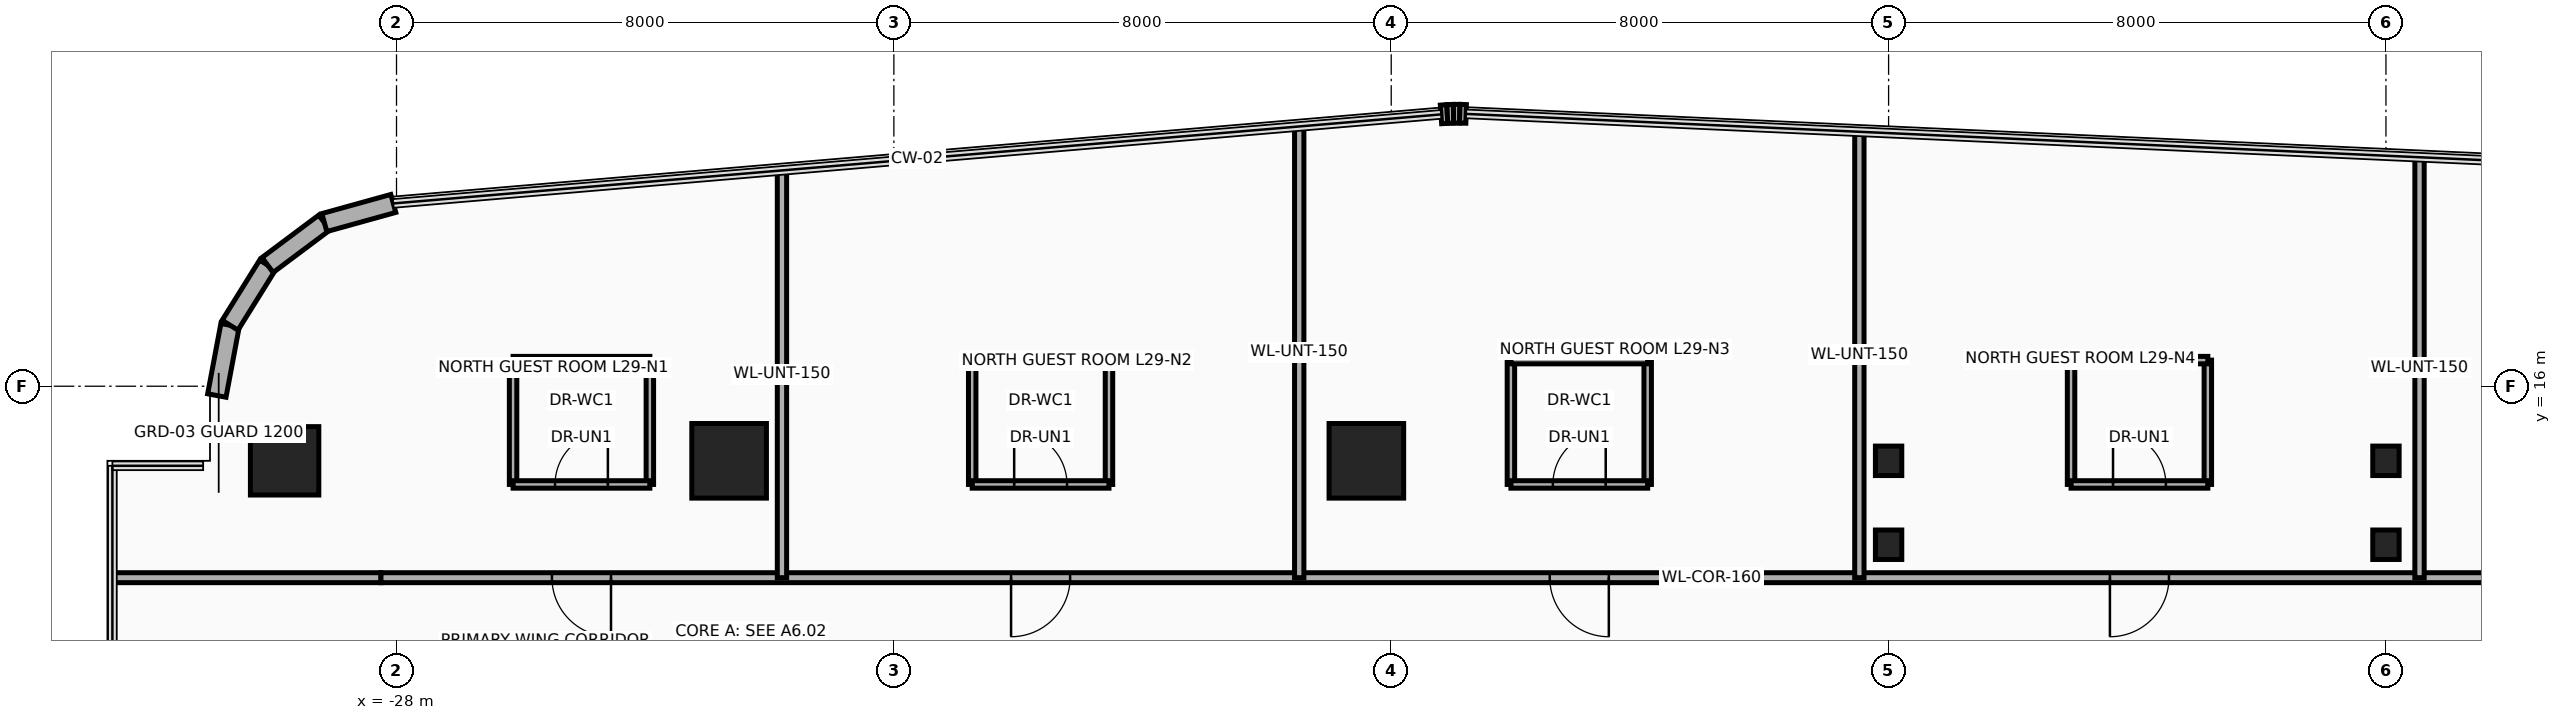
"""IFC4 building model, lengths in metres.
Left out: names, types, materials, properties, quantities, classifications, styles, units other than length and angle.
Written with IfcOpenShell. Run it as: python <this file> out.ifc"""

import sys

from ifc_helpers import new_model, si_unit, direction, frame, frame_2d, origin, origin_2d, place, context, subcontext, project, spatial, rectangle, circle, i_section, extrude, source, transform, mapped, element, fill, save


model = new_model("IFC4")
c1 = context("Model", 3, precision=1e-05, world=origin(), true_north=direction((0.0, 1.0)))
c2 = subcontext(c1, "Body", "Model", "MODEL_VIEW")
j1 = project(units=[si_unit("LENGTHUNIT", "METRE"), si_unit("PLANEANGLEUNIT", "RADIAN")], contexts=[c1])
p1 = place(None, origin())
s1 = spatial("IfcSite", under=j1, at=p1, CompositionType="ELEMENT")
p2 = place(p1, origin())
s2 = spatial("IfcBuilding", under=s1, at=p2, CompositionType="ELEMENT")
p3 = place(p2, frame((0.0, 0.0, 116.8)))
s3 = spatial("IfcBuildingStorey", under=s2, at=p3, CompositionType="ELEMENT", Elevation=116.8)
m1 = source(origin(), c2, "Body", "SweptSolid", [
    extrude(circle(Radius=0.55, at=origin_2d()), origin(), (0.0, 0.0, 1.0), 3.7),
])
p4 = place(p3, frame((-29.8, 14.8, 0.0), z_axis=(0.0, 0.0, 1.0), x_axis=(1.0, 0.0, 0.0)))
e1 = element("IfcColumn", 1, at=p4, inside=s3, PredefinedType="COLUMN", context=c2, shape_type="MappedRepresentation", body=[
    mapped(m1, transform((0.0, 0.0, 0.0), x_axis=(1.0, 0.0, 0.0), y_axis=(0.0, 1.0, 0.0), z_axis=(0.0, 0.0, 1.0), scale=1.0)),
])
m2 = source(origin(), c2, "Body", "SweptSolid", [
    extrude(rectangle(XDim=1.2, YDim=1.2, at=origin_2d()), origin(), (0.0, 0.0, 1.0), 3.7),
])
for number, where, z_axis, x_axis in (
    (2, (-22.65, 14.8, 0.0), (0.0, 0.0, 1.0), (1.0, 0.0, 0.0)),
    (3, (-12.4, 14.8, 0.0), (0.0, 0.0, 1.0), (1.0, 0.0, 0.0)),
):
    element("IfcColumn", number, at=place(p3, frame(where, z_axis=z_axis, x_axis=x_axis)), inside=s3, PredefinedType="COLUMN", context=c2, shape_type="MappedRepresentation", body=[
        mapped(m2, transform((0.0, 0.0, 0.0), x_axis=(1.0, 0.0, 0.0), y_axis=(0.0, 1.0, 0.0), z_axis=(0.0, 0.0, 1.0), scale=1.0)),
    ])
m3 = source(origin(), c2, "Body", "SweptSolid", [
    extrude(i_section(OverallWidth=0.424, OverallDepth=0.474, WebThickness=0.048, FlangeThickness=0.077, at=origin_2d()), origin(), (0.0, 0.0, 1.0), 3.7),
])
for number, where, z_axis, x_axis in (
    (4, (-4.0, 13.45, 0.0), (0.0, 0.0, 1.0), (1.0, 0.0, 0.0)),
    (5, (-4.0, 14.8, 0.0), (0.0, 0.0, 1.0), (1.0, 0.0, 0.0)),
    (6, (4.0, 13.45, 0.0), (0.0, 0.0, 1.0), (1.0, 0.0, 0.0)),
    (7, (4.0, 14.8, 0.0), (0.0, 0.0, 1.0), (1.0, 0.0, 0.0)),
):
    element("IfcColumn", number, at=place(p3, frame(where, z_axis=z_axis, x_axis=x_axis)), inside=s3, PredefinedType="COLUMN", context=c2, shape_type="MappedRepresentation", body=[
        mapped(m3, transform((0.0, 0.0, 0.0), x_axis=(1.0, 0.0, 0.0), y_axis=(0.0, 1.0, 0.0), z_axis=(0.0, 0.0, 1.0), scale=1.0)),
    ])
p5 = place(p3, frame((-30.89, 15.85, 0.0), z_axis=(0.0, 0.0, 1.0), x_axis=(0.184557499391, 0.982821718023, 0.0)))
e8 = element("IfcWall", 8, at=p5, inside=s3, PredefinedType="SOLIDWALL", context=c2, shape_type="SweptSolid", body=[
    extrude(rectangle(XDim=1.151, YDim=0.3, at=frame_2d((0.575, 0.0))), origin(), (0.0, 0.0, 1.0), 3.46),
])
p6 = place(p3, frame((-30.677, 16.981, 0.0), z_axis=(0.0, 0.0, 1.0), x_axis=(0.52880576008, 0.848742875143, 0.0)))
e9 = element("IfcWall", 9, at=p6, inside=s3, PredefinedType="SOLIDWALL", context=c2, shape_type="SweptSolid", body=[
    extrude(rectangle(XDim=1.141, YDim=0.3, at=frame_2d((0.57, 0.0))), origin(), (0.0, 0.0, 1.0), 3.46),
])
p7 = place(p3, frame((-30.074, 17.95, 0.0), z_axis=(0.0, 0.0, 1.0), x_axis=(0.800975009324, 0.598697782223, 0.0)))
e10 = element("IfcWall", 10, at=p7, inside=s3, PredefinedType="SOLIDWALL", context=c2, shape_type="SweptSolid", body=[
    extrude(rectangle(XDim=1.141, YDim=0.3, at=frame_2d((0.57, 0.0))), origin(), (0.0, 0.0, 1.0), 3.46),
])
p8 = place(p3, frame((-29.161, 18.633, 0.0), z_axis=(0.0, 0.0, 1.0), x_axis=(0.963624193367, 0.267260947313, 0.0)))
e11 = element("IfcWall", 11, at=p8, inside=s3, PredefinedType="SOLIDWALL", context=c2, shape_type="SweptSolid", body=[
    extrude(rectangle(XDim=1.151, YDim=0.3, at=frame_2d((0.575, 0.0))), origin(), (0.0, 0.0, 1.0), 3.46),
])
p9 = place(p3, frame((-11.199, 20.373, 0.0), z_axis=(0.0, 0.0, 1.0), x_axis=(0.997567332166, 0.069709524416, 0.0)))
e12 = element("IfcWall", 12, at=p9, inside=s3, PredefinedType="SOLIDWALL", context=c2, shape_type="SweptSolid", body=[
    extrude(rectangle(XDim=0.102, YDim=0.3, at=frame_2d((0.051, 0.0))), origin(), (0.0, 0.0, 1.0), 3.46),
])
p10 = place(p3, frame((-11.098, 20.38, 0.0), z_axis=(0.0, 0.0, 1.0), x_axis=(0.999334672785, 0.03647206835, 0.0)))
e13 = element("IfcWall", 13, at=p10, inside=s3, PredefinedType="SOLIDWALL", context=c2, shape_type="SweptSolid", body=[
    extrude(rectangle(XDim=0.1, YDim=0.3, at=frame_2d((0.05, 0.0))), origin(), (0.0, 0.0, 1.0), 3.46),
])
p11 = place(p3, frame((-10.998, 20.383, 0.0), z_axis=(0.0, 0.0, 1.0), x_axis=(0.999997054401, 0.002427177317, 0.0)))
e14 = element("IfcWall", 14, at=p11, inside=s3, PredefinedType="SOLIDWALL", context=c2, shape_type="SweptSolid", body=[
    extrude(rectangle(XDim=0.101, YDim=0.3, at=frame_2d((0.05, 0.0))), origin(), (0.0, 0.0, 1.0), 3.46),
])
p12 = place(p3, frame((-10.897, 20.384, 0.0), z_axis=(0.0, 0.0, 1.0), x_axis=(0.999584209171, -0.02883415988, 0.0)))
e15 = element("IfcWall", 15, at=p12, inside=s3, PredefinedType="SOLIDWALL", context=c2, shape_type="SweptSolid", body=[
    extrude(rectangle(XDim=0.102, YDim=0.3, at=frame_2d((0.051, 0.0))), origin(), (0.0, 0.0, 1.0), 3.46),
])
p13 = place(p3, frame((-32.54, 12.92, 0.0), z_axis=(0.0, 0.0, 1.0), x_axis=(1.0, 0.0, 0.0)))
e16 = element("IfcWall", 16, at=p13, inside=s3, PredefinedType="PARTITIONING", context=c2, shape_type="SweptSolid", body=[
    extrude(rectangle(XDim=4.29, YDim=0.16, at=frame_2d((2.145, 0.0))), origin(), (0.0, 0.0, 1.0), 2.896),
])
p14 = place(p3, frame((-28.25, 12.92, 0.0), z_axis=(0.0, 0.0, 1.0), x_axis=(1.0, 0.0, 0.0)))
e17 = element("IfcWall", 17, at=p14, inside=s3, PredefinedType="PARTITIONING", context=c2, shape_type="SweptSolid", body=[
    extrude(rectangle(XDim=41.8, YDim=0.16, at=frame_2d((20.9, 0.0))), origin(), (0.0, 0.0, 1.0), 2.666),
])
p15 = place(p14, frame((2.75, 0.0, 0.0)))
e18 = element("IfcOpeningElement", 18, at=p15, cuts=e17, PredefinedType="OPENING", context=c2, shape_type="SweptSolid", body=[
    extrude(rectangle(XDim=0.95, YDim=2.15, at=frame_2d((0.475, 1.075))), frame((0.0, 0.095, 0.0), z_axis=(0.0, -1.0, 0.0), x_axis=(1.0, 0.0, 0.0)), (0.0, 0.0, 1.0), 0.19),
])
p16 = place(p14, frame((10.135, 0.0, 0.0)))
e19 = element("IfcOpeningElement", 19, at=p16, cuts=e17, PredefinedType="OPENING", context=c2, shape_type="SweptSolid", body=[
    extrude(rectangle(XDim=0.95, YDim=2.15, at=frame_2d((0.475, 1.075))), frame((0.0, 0.095, 0.0), z_axis=(0.0, -1.0, 0.0), x_axis=(1.0, 0.0, 0.0)), (0.0, 0.0, 1.0), 0.19),
])
p17 = place(p14, frame((18.8, 0.0, 0.0)))
e20 = element("IfcOpeningElement", 20, at=p17, cuts=e17, PredefinedType="OPENING", context=c2, shape_type="SweptSolid", body=[
    extrude(rectangle(XDim=0.95, YDim=2.15, at=frame_2d((0.475, 1.075))), frame((0.0, 0.095, 0.0), z_axis=(0.0, -1.0, 0.0), x_axis=(1.0, 0.0, 0.0)), (0.0, 0.0, 1.0), 0.19),
])
p18 = place(p14, frame((27.81, 0.0, 0.0)))
e21 = element("IfcOpeningElement", 21, at=p18, cuts=e17, PredefinedType="OPENING", context=c2, shape_type="SweptSolid", body=[
    extrude(rectangle(XDim=0.95, YDim=2.15, at=frame_2d((0.475, 1.075))), frame((0.0, 0.095, 0.0), z_axis=(0.0, -1.0, 0.0), x_axis=(1.0, 0.0, 0.0)), (0.0, 0.0, 1.0), 0.19),
])
p19 = place(p14, frame((35.72, 0.0, 0.0)))
e22 = element("IfcOpeningElement", 22, at=p19, cuts=e17, PredefinedType="OPENING", context=c2, shape_type="SweptSolid", body=[
    extrude(rectangle(XDim=0.95, YDim=2.15, at=frame_2d((0.475, 1.075))), frame((0.0, 0.095, 0.0), z_axis=(0.0, -1.0, 0.0), x_axis=(1.0, 0.0, 0.0)), (0.0, 0.0, 1.0), 0.19),
])
p20 = place(p3, frame((-21.8, 12.92, 0.0), z_axis=(0.0, 0.0, 1.0), x_axis=(0.0, 1.0, 0.0)))
e23 = element("IfcWall", 23, at=p20, inside=s3, PredefinedType="PARTITIONING", context=c2, shape_type="SweptSolid", body=[
    extrude(rectangle(XDim=6.552, YDim=0.15, at=frame_2d((3.276, 0.0))), origin(), (0.0, 0.0, 1.0), 2.666),
])
p21 = place(p3, frame((-13.48, 12.92, 0.0), z_axis=(0.0, 0.0, 1.0), x_axis=(0.0, 1.0, 0.0)))
e24 = element("IfcWall", 24, at=p21, inside=s3, PredefinedType="PARTITIONING", context=c2, shape_type="SweptSolid", body=[
    extrude(rectangle(XDim=7.259, YDim=0.15, at=frame_2d((3.629, 0.0))), origin(), (0.0, 0.0, 1.0), 2.666),
])
p22 = place(p3, frame((-4.47, 12.92, 0.0), z_axis=(0.0, 0.0, 1.0), x_axis=(0.0, 1.0, 0.0)))
e25 = element("IfcWall", 25, at=p22, inside=s3, PredefinedType="PARTITIONING", context=c2, shape_type="SweptSolid", body=[
    extrude(rectangle(XDim=7.173, YDim=0.15, at=frame_2d((3.586, 0.0))), origin(), (0.0, 0.0, 1.0), 2.666),
])
p23 = place(p3, frame((4.54, 12.92, 0.0), z_axis=(0.0, 0.0, 1.0), x_axis=(0.0, 1.0, 0.0)))
e26 = element("IfcWall", 26, at=p23, inside=s3, PredefinedType="PARTITIONING", context=c2, shape_type="SweptSolid", body=[
    extrude(rectangle(XDim=6.764, YDim=0.15, at=frame_2d((3.382, 0.0))), origin(), (0.0, 0.0, 1.0), 2.666),
])
for number, where, z_axis, x_axis in (
    (27, (-26.125, 14.42, 0.0), (0.0, 0.0, 1.0), (0.0, 1.0, 0.0)),
    (28, (-23.925, 14.42, 0.0), (0.0, 0.0, 1.0), (0.0, 1.0, 0.0)),
):
    element("IfcWall", number, at=place(p3, frame(where, z_axis=z_axis, x_axis=x_axis)), inside=s3, PredefinedType="PARTITIONING", context=c2, shape_type="SweptSolid", body=[
        extrude(rectangle(XDim=2.0, YDim=0.12, at=frame_2d((1.0, 0.0))), origin(), (0.0, 0.0, 1.0), 2.666),
    ])
p24 = place(p3, frame((-26.125, 16.42, 0.0), z_axis=(0.0, 0.0, 1.0), x_axis=(1.0, 0.0, 0.0)))
e29 = element("IfcWall", 29, at=p24, inside=s3, PredefinedType="PARTITIONING", context=c2, shape_type="SweptSolid", body=[
    extrude(rectangle(XDim=2.2, YDim=0.12, at=frame_2d((1.1, 0.0))), origin(), (0.0, 0.0, 1.0), 3.46),
])
p25 = place(p3, frame((-26.125, 14.42, 0.0), z_axis=(0.0, 0.0, 1.0), x_axis=(1.0, 0.0, 0.0)))
e30 = element("IfcWall", 30, at=p25, inside=s3, PredefinedType="PARTITIONING", context=c2, shape_type="SweptSolid", body=[
    extrude(rectangle(XDim=2.2, YDim=0.12, at=frame_2d((1.1, 0.0))), origin(), (0.0, 0.0, 1.0), 3.46),
])
p26 = place(p25, frame((0.675, 0.0, 0.0)))
e31 = element("IfcOpeningElement", 31, at=p26, cuts=e30, PredefinedType="OPENING", context=c2, shape_type="SweptSolid", body=[
    extrude(rectangle(XDim=0.85, YDim=2.1, at=frame_2d((0.425, 1.05))), frame((0.0, 0.075, 0.0), z_axis=(0.0, -1.0, 0.0), x_axis=(1.0, 0.0, 0.0)), (0.0, 0.0, 1.0), 0.15),
])
for number, where, z_axis, x_axis in (
    (32, (-18.74, 14.42, 0.0), (0.0, 0.0, 1.0), (0.0, 1.0, 0.0)),
    (33, (-16.54, 14.42, 0.0), (0.0, 0.0, 1.0), (0.0, 1.0, 0.0)),
):
    element("IfcWall", number, at=place(p3, frame(where, z_axis=z_axis, x_axis=x_axis)), inside=s3, PredefinedType="PARTITIONING", context=c2, shape_type="SweptSolid", body=[
        extrude(rectangle(XDim=2.0, YDim=0.12, at=frame_2d((1.0, 0.0))), origin(), (0.0, 0.0, 1.0), 2.666),
    ])
p27 = place(p3, frame((-18.74, 16.42, 0.0), z_axis=(0.0, 0.0, 1.0), x_axis=(1.0, 0.0, 0.0)))
e34 = element("IfcWall", 34, at=p27, inside=s3, PredefinedType="PARTITIONING", context=c2, shape_type="SweptSolid", body=[
    extrude(rectangle(XDim=2.2, YDim=0.12, at=frame_2d((1.1, 0.0))), origin(), (0.0, 0.0, 1.0), 3.46),
])
p28 = place(p3, frame((-18.74, 14.42, 0.0), z_axis=(0.0, 0.0, 1.0), x_axis=(1.0, 0.0, 0.0)))
e35 = element("IfcWall", 35, at=p28, inside=s3, PredefinedType="PARTITIONING", context=c2, shape_type="SweptSolid", body=[
    extrude(rectangle(XDim=2.2, YDim=0.12, at=frame_2d((1.1, 0.0))), origin(), (0.0, 0.0, 1.0), 3.46),
])
p29 = place(p28, frame((0.675, 0.0, 0.0)))
e36 = element("IfcOpeningElement", 36, at=p29, cuts=e35, PredefinedType="OPENING", context=c2, shape_type="SweptSolid", body=[
    extrude(rectangle(XDim=0.85, YDim=2.1, at=frame_2d((0.425, 1.05))), frame((0.0, 0.075, 0.0), z_axis=(0.0, -1.0, 0.0), x_axis=(1.0, 0.0, 0.0)), (0.0, 0.0, 1.0), 0.15),
])
for number, where, z_axis, x_axis in (
    (37, (-10.075, 14.42, 0.0), (0.0, 0.0, 1.0), (0.0, 1.0, 0.0)),
    (38, (-7.875, 14.42, 0.0), (0.0, 0.0, 1.0), (0.0, 1.0, 0.0)),
):
    element("IfcWall", number, at=place(p3, frame(where, z_axis=z_axis, x_axis=x_axis)), inside=s3, PredefinedType="PARTITIONING", context=c2, shape_type="SweptSolid", body=[
        extrude(rectangle(XDim=2.0, YDim=0.12, at=frame_2d((1.0, 0.0))), origin(), (0.0, 0.0, 1.0), 2.666),
    ])
p30 = place(p3, frame((-10.075, 16.42, 0.0), z_axis=(0.0, 0.0, 1.0), x_axis=(1.0, 0.0, 0.0)))
e39 = element("IfcWall", 39, at=p30, inside=s3, PredefinedType="PARTITIONING", context=c2, shape_type="SweptSolid", body=[
    extrude(rectangle(XDim=2.2, YDim=0.12, at=frame_2d((1.1, 0.0))), origin(), (0.0, 0.0, 1.0), 3.46),
])
p31 = place(p3, frame((-10.075, 14.42, 0.0), z_axis=(0.0, 0.0, 1.0), x_axis=(1.0, 0.0, 0.0)))
e40 = element("IfcWall", 40, at=p31, inside=s3, PredefinedType="PARTITIONING", context=c2, shape_type="SweptSolid", body=[
    extrude(rectangle(XDim=2.2, YDim=0.12, at=frame_2d((1.1, 0.0))), origin(), (0.0, 0.0, 1.0), 3.46),
])
p32 = place(p31, frame((0.675, 0.0, 0.0)))
e41 = element("IfcOpeningElement", 41, at=p32, cuts=e40, PredefinedType="OPENING", context=c2, shape_type="SweptSolid", body=[
    extrude(rectangle(XDim=0.85, YDim=2.1, at=frame_2d((0.425, 1.05))), frame((0.0, 0.075, 0.0), z_axis=(0.0, -1.0, 0.0), x_axis=(1.0, 0.0, 0.0)), (0.0, 0.0, 1.0), 0.15),
])
for number, where, z_axis, x_axis in (
    (42, (-1.065, 14.42, 0.0), (0.0, 0.0, 1.0), (0.0, 1.0, 0.0)),
    (43, (1.135, 14.42, 0.0), (0.0, 0.0, 1.0), (0.0, 1.0, 0.0)),
):
    element("IfcWall", number, at=place(p3, frame(where, z_axis=z_axis, x_axis=x_axis)), inside=s3, PredefinedType="PARTITIONING", context=c2, shape_type="SweptSolid", body=[
        extrude(rectangle(XDim=2.0, YDim=0.12, at=frame_2d((1.0, 0.0))), origin(), (0.0, 0.0, 1.0), 2.666),
    ])
p33 = place(p3, frame((-1.065, 16.42, 0.0), z_axis=(0.0, 0.0, 1.0), x_axis=(1.0, 0.0, 0.0)))
e44 = element("IfcWall", 44, at=p33, inside=s3, PredefinedType="PARTITIONING", context=c2, shape_type="SweptSolid", body=[
    extrude(rectangle(XDim=2.2, YDim=0.12, at=frame_2d((1.1, 0.0))), origin(), (0.0, 0.0, 1.0), 3.46),
])
p34 = place(p3, frame((-1.065, 14.42, 0.0), z_axis=(0.0, 0.0, 1.0), x_axis=(1.0, 0.0, 0.0)))
e45 = element("IfcWall", 45, at=p34, inside=s3, PredefinedType="PARTITIONING", context=c2, shape_type="SweptSolid", body=[
    extrude(rectangle(XDim=2.2, YDim=0.12, at=frame_2d((1.1, 0.0))), origin(), (0.0, 0.0, 1.0), 3.46),
])
p35 = place(p34, frame((0.675, 0.0, 0.0)))
e46 = element("IfcOpeningElement", 46, at=p35, cuts=e45, PredefinedType="OPENING", context=c2, shape_type="SweptSolid", body=[
    extrude(rectangle(XDim=0.85, YDim=2.1, at=frame_2d((0.425, 1.05))), frame((0.0, 0.075, 0.0), z_axis=(0.0, -1.0, 0.0), x_axis=(1.0, 0.0, 0.0)), (0.0, 0.0, 1.0), 0.15),
])
p36 = place(p15, frame((0.95, 0.0, 0.0), z_axis=(0.0, 0.0, 1.0), x_axis=(-1.0, 0.0, 0.0)))
e47 = element("IfcDoor", 47, at=p36, inside=s3, OperationType="SINGLE_SWING_LEFT", PredefinedType="DOOR", context=c2, shape_type="SweptSolid", body=[
    extrude(rectangle(XDim=0.95, YDim=2.15, at=frame_2d((0.475, 1.075))), frame((0.0, 0.025, 0.0), z_axis=(0.0, -1.0, 0.0), x_axis=(1.0, 0.0, 0.0)), (0.0, 0.0, 1.0), 0.05),
])
fill(e18, e47)
p37 = place(p26, origin())
e48 = element("IfcDoor", 48, at=p37, inside=s3, OperationType="SINGLE_SWING_RIGHT", PredefinedType="DOOR", context=c2, shape_type="SweptSolid", body=[
    extrude(rectangle(XDim=0.85, YDim=2.1, at=frame_2d((0.425, 1.05))), frame((0.0, 0.025, 0.0), z_axis=(0.0, -1.0, 0.0), x_axis=(1.0, 0.0, 0.0)), (0.0, 0.0, 1.0), 0.05),
])
fill(e31, e48)
p38 = place(p16, frame((0.95, 0.0, 0.0), z_axis=(0.0, 0.0, 1.0), x_axis=(-1.0, 0.0, 0.0)))
e49 = element("IfcDoor", 49, at=p38, inside=s3, OperationType="SINGLE_SWING_LEFT", PredefinedType="DOOR", context=c2, shape_type="SweptSolid", body=[
    extrude(rectangle(XDim=0.95, YDim=2.15, at=frame_2d((0.475, 1.075))), frame((0.0, 0.025, 0.0), z_axis=(0.0, -1.0, 0.0), x_axis=(1.0, 0.0, 0.0)), (0.0, 0.0, 1.0), 0.05),
])
fill(e19, e49)
p39 = place(p29, origin())
e50 = element("IfcDoor", 50, at=p39, inside=s3, OperationType="SINGLE_SWING_RIGHT", PredefinedType="DOOR", context=c2, shape_type="SweptSolid", body=[
    extrude(rectangle(XDim=0.85, YDim=2.1, at=frame_2d((0.425, 1.05))), frame((0.0, 0.025, 0.0), z_axis=(0.0, -1.0, 0.0), x_axis=(1.0, 0.0, 0.0)), (0.0, 0.0, 1.0), 0.05),
])
fill(e36, e50)
p40 = place(p17, frame((0.95, 0.0, 0.0), z_axis=(0.0, 0.0, 1.0), x_axis=(-1.0, 0.0, 0.0)))
e51 = element("IfcDoor", 51, at=p40, inside=s3, OperationType="SINGLE_SWING_LEFT", PredefinedType="DOOR", context=c2, shape_type="SweptSolid", body=[
    extrude(rectangle(XDim=0.95, YDim=2.15, at=frame_2d((0.475, 1.075))), frame((0.0, 0.025, 0.0), z_axis=(0.0, -1.0, 0.0), x_axis=(1.0, 0.0, 0.0)), (0.0, 0.0, 1.0), 0.05),
])
fill(e20, e51)
p41 = place(p32, origin())
e52 = element("IfcDoor", 52, at=p41, inside=s3, OperationType="SINGLE_SWING_RIGHT", PredefinedType="DOOR", context=c2, shape_type="SweptSolid", body=[
    extrude(rectangle(XDim=0.85, YDim=2.1, at=frame_2d((0.425, 1.05))), frame((0.0, 0.025, 0.0), z_axis=(0.0, -1.0, 0.0), x_axis=(1.0, 0.0, 0.0)), (0.0, 0.0, 1.0), 0.05),
])
fill(e41, e52)
p42 = place(p18, frame((0.95, 0.0, 0.0), z_axis=(0.0, 0.0, 1.0), x_axis=(-1.0, 0.0, 0.0)))
e53 = element("IfcDoor", 53, at=p42, inside=s3, OperationType="SINGLE_SWING_LEFT", PredefinedType="DOOR", context=c2, shape_type="SweptSolid", body=[
    extrude(rectangle(XDim=0.95, YDim=2.15, at=frame_2d((0.475, 1.075))), frame((0.0, 0.025, 0.0), z_axis=(0.0, -1.0, 0.0), x_axis=(1.0, 0.0, 0.0)), (0.0, 0.0, 1.0), 0.05),
])
fill(e21, e53)
p43 = place(p35, origin())
e54 = element("IfcDoor", 54, at=p43, inside=s3, OperationType="SINGLE_SWING_RIGHT", PredefinedType="DOOR", context=c2, shape_type="SweptSolid", body=[
    extrude(rectangle(XDim=0.85, YDim=2.1, at=frame_2d((0.425, 1.05))), frame((0.0, 0.025, 0.0), z_axis=(0.0, -1.0, 0.0), x_axis=(1.0, 0.0, 0.0)), (0.0, 0.0, 1.0), 0.05),
])
fill(e46, e54)
save(model, sys.argv[1])
